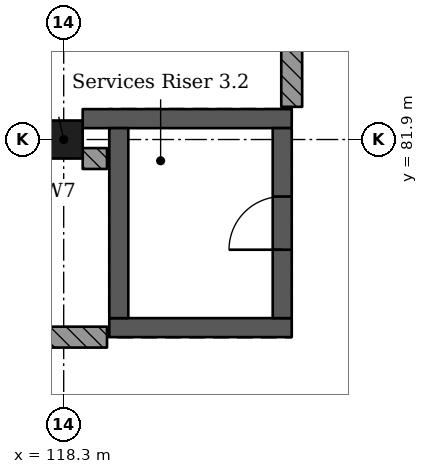
"""IFC4 building model, lengths in metres.
Left out: names, types, materials, properties, quantities, classifications, styles, units other than length and angle.
Written with IfcOpenShell. Run it as: python <this file> out.ifc"""

import sys

from ifc_helpers import new_model, si_unit, direction, frame, frame_2d, origin, origin_2d, place, context, subcontext, project, spatial, rectangle, extrude, element, fill, save


model = new_model("IFC4")
c1 = context("Model", 3, precision=1e-05, world=origin(), true_north=direction((0.0, 1.0)))
c2 = subcontext(c1, "Body", "Model", "MODEL_VIEW")
j1 = project(units=[si_unit("LENGTHUNIT", "METRE"), si_unit("PLANEANGLEUNIT", "RADIAN")], contexts=[c1])
p1 = place(None, origin())
s1 = spatial("IfcSite", under=j1, at=p1, CompositionType="ELEMENT")
p2 = place(p1, origin())
s2 = spatial("IfcBuilding", under=s1, at=p2, CompositionType="ELEMENT")
p3 = place(p2, frame((0.0, 0.0, 24.57)))
s3 = spatial("IfcBuildingStorey", under=s2, at=p3, CompositionType="ELEMENT", Elevation=24.57)
p4 = place(p3, frame((118.3, 81.9, 0.0), z_axis=(0.0, 0.0, 1.0), x_axis=(1.0, 0.0, 0.0)))
e1 = element("IfcColumn", 1, at=p4, inside=s3, PredefinedType="COLUMN", context=c2, shape_type="SweptSolid", body=[
    extrude(rectangle(XDim=0.5, YDim=0.5, at=origin_2d()), origin(), (0.0, 0.0, 1.0), 4.55),
])
p5 = place(p3, frame((121.3, 79.425, 0.0), z_axis=(0.0, 0.0, 1.0), x_axis=(-1.0, 0.0, 0.0)))
e2 = element("IfcWall", 2, at=p5, inside=s3, PredefinedType="SHEAR", context=c2, shape_type="SweptSolid", body=[
    extrude(rectangle(XDim=2.4, YDim=0.25, at=frame_2d((1.2, 0.0))), origin(), (0.0, 0.0, 1.0), 4.55),
])
p6 = place(p3, frame((121.3, 82.175, 0.0), z_axis=(0.0, 0.0, 1.0), x_axis=(-1.0, 0.0, 0.0)))
e3 = element("IfcWall", 3, at=p6, inside=s3, PredefinedType="SHEAR", context=c2, shape_type="SweptSolid", body=[
    extrude(rectangle(XDim=2.75, YDim=0.25, at=frame_2d((1.375, 0.0))), origin(), (0.0, 0.0, 1.0), 4.55),
])
p7 = place(p3, frame((119.025, 82.05, 0.0), z_axis=(0.0, 0.0, 1.0), x_axis=(0.0, -1.0, 0.0)))
e4 = element("IfcWall", 4, at=p7, inside=s3, PredefinedType="SHEAR", context=c2, shape_type="SweptSolid", body=[
    extrude(rectangle(XDim=2.5, YDim=0.25, at=frame_2d((1.25, 0.0))), origin(), (0.0, 0.0, 1.0), 4.55),
])
p8 = place(p3, frame((121.175, 82.05, 0.0), z_axis=(0.0, 0.0, 1.0), x_axis=(0.0, -1.0, 0.0)))
e5 = element("IfcWall", 5, at=p8, inside=s3, PredefinedType="SHEAR", context=c2, shape_type="SweptSolid", body=[
    extrude(rectangle(XDim=2.5, YDim=0.25, at=frame_2d((1.25, 0.0))), origin(), (0.0, 0.0, 1.0), 4.55),
])
p9 = place(p8, frame((0.9, 0.0, 0.0)))
e6 = element("IfcOpeningElement", 6, at=p9, cuts=e5, PredefinedType="OPENING", context=c2, shape_type="SweptSolid", body=[
    extrude(rectangle(XDim=0.7, YDim=2.1, at=frame_2d((0.35, 1.05))), frame((0.0, 0.135, 0.0), z_axis=(0.0, -1.0, 0.0), x_axis=(1.0, 0.0, 0.0)), (0.0, 0.0, 1.0), 0.27),
])
p10 = place(p3, frame((118.55, 81.65, 0.0), z_axis=(0.0, 0.0, 1.0), x_axis=(1.0, 0.0, 0.0)))
e7 = element("IfcWall", 7, at=p10, inside=s3, PredefinedType="SOLIDWALL", context=c2, shape_type="SweptSolid", body=[
    extrude(rectangle(XDim=0.32, YDim=0.275, at=frame_2d((0.16, 0.0))), origin(), (0.0, 0.0, 1.0), 4.35),
])
p11 = place(p3, frame((118.87, 79.3, 0.0), z_axis=(0.0, 0.0, 1.0), x_axis=(-1.0, 0.0, 0.0)))
e8 = element("IfcWall", 8, at=p11, inside=s3, PredefinedType="SOLIDWALL", context=c2, shape_type="SweptSolid", body=[
    extrude(rectangle(XDim=1.508, YDim=0.275, at=frame_2d((0.754, 0.0))), origin(), (0.0, 0.0, 1.0), 4.35),
])
p12 = place(p3, frame((121.3, 82.33, 0.0), z_axis=(0.0, 0.0, 1.0), x_axis=(0.0, 1.0, 0.0)))
e9 = element("IfcWall", 9, at=p12, inside=s3, PredefinedType="SOLIDWALL", context=c2, shape_type="SweptSolid", body=[
    extrude(rectangle(XDim=6.932, YDim=0.275, at=frame_2d((3.466, 0.0))), origin(), (0.0, 0.0, 1.0), 4.35),
])
p13 = place(p9, origin())
e10 = element("IfcDoor", 10, at=p13, inside=s3, OperationType="SINGLE_SWING_RIGHT", PredefinedType="DOOR", context=c2, shape_type="SweptSolid", body=[
    extrude(rectangle(XDim=0.7, YDim=2.1, at=frame_2d((0.35, 1.05))), frame((0.0, 0.025, 0.0), z_axis=(0.0, -1.0, 0.0), x_axis=(1.0, 0.0, 0.0)), (0.0, 0.0, 1.0), 0.05),
])
fill(e6, e10)
save(model, sys.argv[1])
